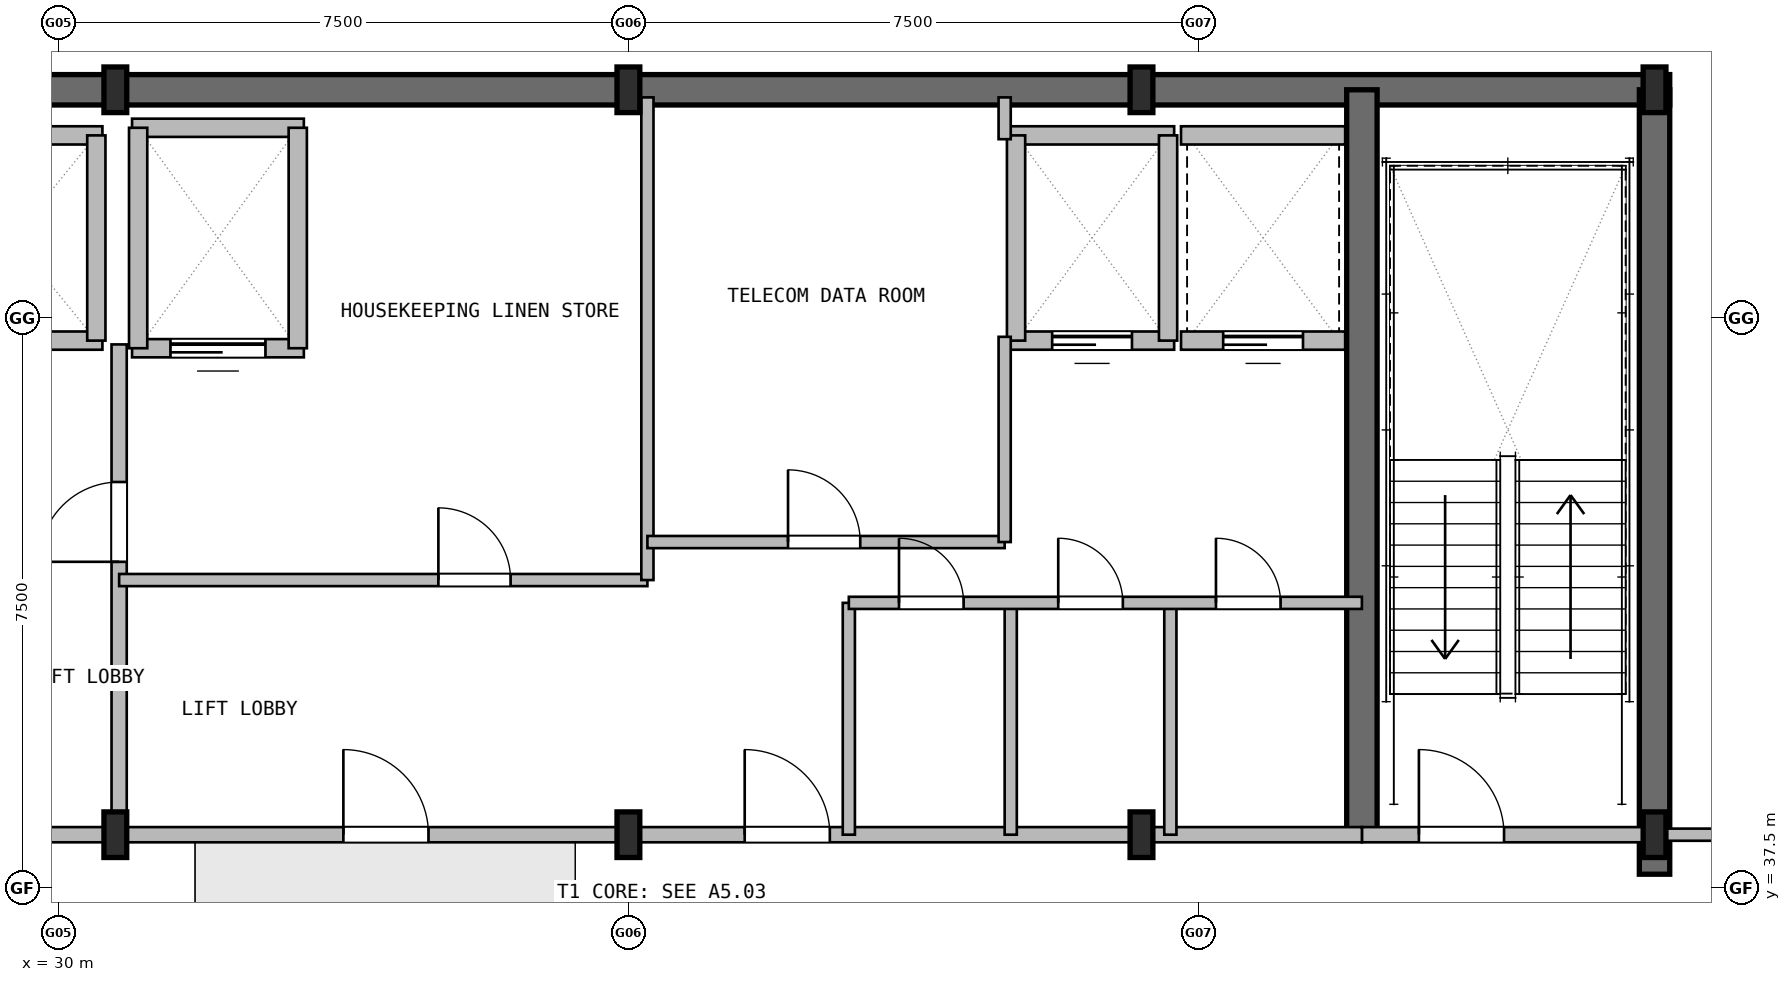
"""IFC4 building model, lengths in metres.
Left out: names, types, materials, properties, quantities, classifications, styles, units other than length and angle.
Written with IfcOpenShell. Run it as: python <this file> out.ifc"""

import sys

from ifc_helpers import new_model, si_unit, direction, frame, frame_2d, origin, origin_2d, place, context, subcontext, project, spatial, rectangle, i_section, extrude, element, fill, save


model = new_model("IFC4")
c1 = context("Model", 3, precision=1e-05, world=origin(), true_north=direction((0.0, 1.0)))
c2 = subcontext(c1, "Body", "Model", "MODEL_VIEW")
j1 = project(units=[si_unit("LENGTHUNIT", "METRE"), si_unit("PLANEANGLEUNIT", "RADIAN")], contexts=[c1])
p1 = place(None, origin())
s1 = spatial("IfcSite", under=j1, at=p1, CompositionType="ELEMENT")
p2 = place(p1, origin())
s2 = spatial("IfcBuilding", under=s1, at=p2, CompositionType="ELEMENT")
p3 = place(p2, frame((0.0, 0.0, 197.1)))
s3 = spatial("IfcBuildingStorey", under=s2, at=p3, CompositionType="ELEMENT", Elevation=197.1)
p4 = place(p3, frame((23.8, 48.0, 0.0), z_axis=(0.0, 0.0, 1.0), x_axis=(1.0, 0.0, 0.0)))
e1 = element("IfcWall", 1, at=p4, inside=s3, PredefinedType="SHEAR", context=c2, shape_type="SweptSolid", body=[
    extrude(rectangle(XDim=27.4, YDim=0.4, at=frame_2d((13.7, 0.0))), origin(), (0.0, 0.0, 1.0), 4.2),
])
p5 = place(p3, frame((51.0, 37.68, 0.0), z_axis=(0.0, 0.0, 1.0), x_axis=(0.0, 1.0, 0.0)))
e2 = element("IfcWall", 2, at=p5, inside=s3, PredefinedType="SHEAR", context=c2, shape_type="SweptSolid", body=[
    extrude(rectangle(XDim=10.32, YDim=0.4, at=frame_2d((5.16, 0.0))), origin(), (0.0, 0.0, 1.0), 4.2),
])
p6 = place(p3, frame((47.15, 38.2, 0.0), z_axis=(0.0, 0.0, 1.0), x_axis=(0.0, 1.0, 0.0)))
e3 = element("IfcWall", 3, at=p6, inside=s3, PredefinedType="SHEAR", context=c2, shape_type="SweptSolid", body=[
    extrude(rectangle(XDim=9.8, YDim=0.4, at=frame_2d((4.9, 0.0))), origin(), (0.0, 0.0, 1.0), 4.2),
])
for number, where, z_axis, x_axis in (
    (4, (30.75, 38.2, 0.0), (0.0, 0.0, 1.0), (1.0, 0.0, 0.0)),
    (5, (30.75, 48.0, 0.0), (0.0, 0.0, 1.0), (1.0, 0.0, 0.0)),
    (6, (37.5, 38.2, 0.0), (0.0, 0.0, 1.0), (1.0, 0.0, 0.0)),
    (7, (37.5, 48.0, 0.0), (0.0, 0.0, 1.0), (1.0, 0.0, 0.0)),
    (8, (44.25, 38.2, 0.0), (0.0, 0.0, 1.0), (1.0, 0.0, 0.0)),
    (9, (44.25, 48.0, 0.0), (0.0, 0.0, 1.0), (1.0, 0.0, 0.0)),
    (10, (51.0, 38.2, 0.0), (0.0, 0.0, 1.0), (1.0, 0.0, 0.0)),
    (11, (51.0, 48.0, 0.0), (0.0, 0.0, 1.0), (1.0, 0.0, 0.0)),
):
    element("IfcColumn", number, at=place(p3, frame(where, z_axis=z_axis, x_axis=x_axis)), inside=s3, PredefinedType="COLUMN", context=c2, shape_type="SweptSolid", body=[
        extrude(i_section(OverallWidth=0.3, OverallDepth=0.6, WebThickness=0.014, FlangeThickness=0.025, at=origin_2d()), origin(), (0.0, 0.0, 1.0), 4.2),
    ])
p7 = place(p3, frame((47.15, 38.2, 0.0), z_axis=(0.0, 0.0, 1.0), x_axis=(1.0, 0.0, 0.0)))
e12 = element("IfcWall", 12, at=p7, inside=s3, PredefinedType="PARTITIONING", context=c2, shape_type="SweptSolid", body=[
    extrude(rectangle(XDim=3.85, YDim=0.2, at=frame_2d((1.925, 0.0))), origin(), (0.0, 0.0, 1.0), 3.28),
])
p8 = place(p7, frame((0.75, 0.0, 0.0)))
e13 = element("IfcOpeningElement", 13, at=p8, cuts=e12, PredefinedType="OPENING", context=c2, shape_type="SweptSolid", body=[
    extrude(rectangle(XDim=1.12, YDim=2.1, at=frame_2d((0.56, 1.05))), frame((0.0, 0.11, 0.0), z_axis=(0.0, -1.0, 0.0), x_axis=(1.0, 0.0, 0.0)), (0.0, 0.0, 1.0), 0.22),
])
p9 = place(p3, frame((30.8, 38.2, 0.0), z_axis=(0.0, 0.0, 1.0), x_axis=(0.0, 1.0, 0.0)))
e14 = element("IfcWall", 14, at=p9, inside=s3, PredefinedType="PARTITIONING", context=c2, shape_type="SweptSolid", body=[
    extrude(rectangle(XDim=6.45, YDim=0.2, at=frame_2d((3.225, 0.0))), origin(), (0.0, 0.0, 1.0), 3.28),
])
p10 = place(p9, frame((3.59, 0.0, 0.0)))
e15 = element("IfcOpeningElement", 15, at=p10, cuts=e14, PredefinedType="OPENING", context=c2, shape_type="SweptSolid", body=[
    extrude(rectangle(XDim=1.05, YDim=2.1, at=frame_2d((0.525, 1.05))), frame((0.0, 0.11, 0.0), z_axis=(0.0, -1.0, 0.0), x_axis=(1.0, 0.0, 0.0)), (0.0, 0.0, 1.0), 0.22),
])
p11 = place(p3, frame((27.95, 38.2, 0.0), z_axis=(0.0, 0.0, 1.0), x_axis=(1.0, 0.0, 0.0)))
e16 = element("IfcWall", 16, at=p11, inside=s3, PredefinedType="PARTITIONING", context=c2, shape_type="SweptSolid", body=[
    extrude(rectangle(XDim=2.85, YDim=0.2, at=frame_2d((1.425, 0.0))), origin(), (0.0, 0.0, 1.0), 3.28),
])
p12 = place(p11, frame((0.75, 0.0, 0.0)))
e17 = element("IfcOpeningElement", 17, at=p12, cuts=e16, PredefinedType="OPENING", context=c2, shape_type="SweptSolid", body=[
    extrude(rectangle(XDim=1.05, YDim=2.1, at=frame_2d((0.525, 1.05))), frame((0.0, 0.11, 0.0), z_axis=(0.0, -1.0, 0.0), x_axis=(1.0, 0.0, 0.0)), (0.0, 0.0, 1.0), 0.22),
])
p13 = place(p3, frame((30.8, 38.2, 0.0), z_axis=(0.0, 0.0, 1.0), x_axis=(1.0, 0.0, 0.0)))
e18 = element("IfcWall", 18, at=p13, inside=s3, PredefinedType="PARTITIONING", context=c2, shape_type="SweptSolid", body=[
    extrude(rectangle(XDim=16.35, YDim=0.2, at=frame_2d((8.175, 0.0))), origin(), (0.0, 0.0, 1.0), 3.28),
])
p14 = place(p13, frame((2.95, 0.0, 0.0)))
e19 = element("IfcOpeningElement", 19, at=p14, cuts=e18, PredefinedType="OPENING", context=c2, shape_type="SweptSolid", body=[
    extrude(rectangle(XDim=1.12, YDim=2.1, at=frame_2d((0.56, 1.05))), frame((0.0, 0.11, 0.0), z_axis=(0.0, -1.0, 0.0), x_axis=(1.0, 0.0, 0.0)), (0.0, 0.0, 1.0), 0.22),
])
p15 = place(p13, frame((8.23, 0.0, 0.0)))
e20 = element("IfcOpeningElement", 20, at=p15, cuts=e18, PredefinedType="OPENING", context=c2, shape_type="SweptSolid", body=[
    extrude(rectangle(XDim=1.12, YDim=2.1, at=frame_2d((0.56, 1.05))), frame((0.0, 0.11, 0.0), z_axis=(0.0, -1.0, 0.0), x_axis=(1.0, 0.0, 0.0)), (0.0, 0.0, 1.0), 0.22),
])
p16 = place(p3, frame((28.22, 44.7, 0.0), z_axis=(0.0, 0.0, 1.0), x_axis=(1.0, 0.0, 0.0)))
e21 = element("IfcWall", 21, at=p16, inside=s3, PredefinedType="PARTITIONING", context=c2, shape_type="SweptSolid", body=[
    extrude(rectangle(XDim=2.36, YDim=0.24, at=frame_2d((1.18, 0.0))), origin(), (0.0, 0.0, 1.0), 3.58),
])
p17 = place(p16, frame((0.705, 0.0, 0.0)))
e22 = element("IfcOpeningElement", 22, at=p17, cuts=e21, PredefinedType="OPENING", context=c2, shape_type="SweptSolid", body=[
    extrude(rectangle(XDim=0.95, YDim=2.15, at=frame_2d((0.475, 1.075))), frame((0.0, 0.13, 0.0), z_axis=(0.0, -1.0, 0.0), x_axis=(1.0, 0.0, 0.0)), (0.0, 0.0, 1.0), 0.26),
])
p18 = place(p3, frame((28.22, 47.4, 0.0), z_axis=(0.0, 0.0, 1.0), x_axis=(1.0, 0.0, 0.0)))
e23 = element("IfcWall", 23, at=p18, inside=s3, PredefinedType="PARTITIONING", context=c2, shape_type="SweptSolid", body=[
    extrude(rectangle(XDim=2.36, YDim=0.24, at=frame_2d((1.18, 0.0))), origin(), (0.0, 0.0, 1.0), 3.88),
])
p19 = place(p3, frame((30.5, 44.7, 0.0), z_axis=(0.0, 0.0, 1.0), x_axis=(0.0, 1.0, 0.0)))
e24 = element("IfcWall", 24, at=p19, inside=s3, PredefinedType="PARTITIONING", context=c2, shape_type="SweptSolid", body=[
    extrude(rectangle(XDim=2.7, YDim=0.24, at=frame_2d((1.35, 0.0))), origin(), (0.0, 0.0, 1.0), 3.28),
])
p20 = place(p3, frame((30.97, 44.6, 0.0), z_axis=(0.0, 0.0, 1.0), x_axis=(1.0, 0.0, 0.0)))
e25 = element("IfcWall", 25, at=p20, inside=s3, PredefinedType="PARTITIONING", context=c2, shape_type="SweptSolid", body=[
    extrude(rectangle(XDim=2.26, YDim=0.24, at=frame_2d((1.13, 0.0))), origin(), (0.0, 0.0, 1.0), 3.88),
])
p21 = place(p20, frame((0.505, 0.0, 0.0)))
e26 = element("IfcOpeningElement", 26, at=p21, cuts=e25, PredefinedType="OPENING", context=c2, shape_type="SweptSolid", body=[
    extrude(rectangle(XDim=1.25, YDim=2.2, at=frame_2d((0.625, 1.1))), frame((0.0, 0.13, 0.0), z_axis=(0.0, -1.0, 0.0), x_axis=(1.0, 0.0, 0.0)), (0.0, 0.0, 1.0), 0.26),
])
p22 = place(p3, frame((30.97, 47.5, 0.0), z_axis=(0.0, 0.0, 1.0), x_axis=(1.0, 0.0, 0.0)))
e27 = element("IfcWall", 27, at=p22, inside=s3, PredefinedType="PARTITIONING", context=c2, shape_type="SweptSolid", body=[
    extrude(rectangle(XDim=2.26, YDim=0.24, at=frame_2d((1.13, 0.0))), origin(), (0.0, 0.0, 1.0), 3.88),
])
for number, where, z_axis, x_axis in (
    (28, (31.05, 44.6, 0.0), (0.0, 0.0, 1.0), (0.0, 1.0, 0.0)),
    (29, (33.15, 44.6, 0.0), (0.0, 0.0, 1.0), (0.0, 1.0, 0.0)),
):
    element("IfcWall", number, at=place(p3, frame(where, z_axis=z_axis, x_axis=x_axis)), inside=s3, PredefinedType="PARTITIONING", context=c2, shape_type="SweptSolid", body=[
        extrude(rectangle(XDim=2.9, YDim=0.24, at=frame_2d((1.45, 0.0))), origin(), (0.0, 0.0, 1.0), 3.88),
    ])
p23 = place(p3, frame((42.52, 44.7, 0.0), z_axis=(0.0, 0.0, 1.0), x_axis=(1.0, 0.0, 0.0)))
e30 = element("IfcWall", 30, at=p23, inside=s3, PredefinedType="PARTITIONING", context=c2, shape_type="SweptSolid", body=[
    extrude(rectangle(XDim=2.16, YDim=0.24, at=frame_2d((1.08, 0.0))), origin(), (0.0, 0.0, 1.0), 3.88),
])
p24 = place(p23, frame((0.555, 0.0, 0.0)))
e31 = element("IfcOpeningElement", 31, at=p24, cuts=e30, PredefinedType="OPENING", context=c2, shape_type="SweptSolid", body=[
    extrude(rectangle(XDim=1.05, YDim=2.15, at=frame_2d((0.525, 1.075))), frame((0.0, 0.13, 0.0), z_axis=(0.0, -1.0, 0.0), x_axis=(1.0, 0.0, 0.0)), (0.0, 0.0, 1.0), 0.26),
])
p25 = place(p3, frame((42.52, 47.4, 0.0), z_axis=(0.0, 0.0, 1.0), x_axis=(1.0, 0.0, 0.0)))
e32 = element("IfcWall", 32, at=p25, inside=s3, PredefinedType="PARTITIONING", context=c2, shape_type="SweptSolid", body=[
    extrude(rectangle(XDim=2.16, YDim=0.24, at=frame_2d((1.08, 0.0))), origin(), (0.0, 0.0, 1.0), 3.88),
])
for number, where, z_axis, x_axis in (
    (33, (42.6, 44.7, 0.0), (0.0, 0.0, 1.0), (0.0, 1.0, 0.0)),
    (34, (44.6, 44.7, 0.0), (0.0, 0.0, 1.0), (0.0, 1.0, 0.0)),
):
    element("IfcWall", number, at=place(p3, frame(where, z_axis=z_axis, x_axis=x_axis)), inside=s3, PredefinedType="PARTITIONING", context=c2, shape_type="SweptSolid", body=[
        extrude(rectangle(XDim=2.7, YDim=0.24, at=frame_2d((1.35, 0.0))), origin(), (0.0, 0.0, 1.0), 3.88),
    ])
p26 = place(p3, frame((44.77, 44.7, 0.0), z_axis=(0.0, 0.0, 1.0), x_axis=(1.0, 0.0, 0.0)))
e35 = element("IfcWall", 35, at=p26, inside=s3, PredefinedType="PARTITIONING", context=c2, shape_type="SweptSolid", body=[
    extrude(rectangle(XDim=2.16, YDim=0.24, at=frame_2d((1.08, 0.0))), origin(), (0.0, 0.0, 1.0), 3.88),
])
p27 = place(p26, frame((0.555, 0.0, 0.0)))
e36 = element("IfcOpeningElement", 36, at=p27, cuts=e35, PredefinedType="OPENING", context=c2, shape_type="SweptSolid", body=[
    extrude(rectangle(XDim=1.05, YDim=2.15, at=frame_2d((0.525, 1.075))), frame((0.0, 0.13, 0.0), z_axis=(0.0, -1.0, 0.0), x_axis=(1.0, 0.0, 0.0)), (0.0, 0.0, 1.0), 0.26),
])
p28 = place(p3, frame((44.77, 47.4, 0.0), z_axis=(0.0, 0.0, 1.0), x_axis=(1.0, 0.0, 0.0)))
e37 = element("IfcWall", 37, at=p28, inside=s3, PredefinedType="PARTITIONING", context=c2, shape_type="SweptSolid", body=[
    extrude(rectangle(XDim=2.16, YDim=0.24, at=frame_2d((1.08, 0.0))), origin(), (0.0, 0.0, 1.0), 3.88),
])
p29 = place(p3, frame((30.8, 41.55, 0.0), z_axis=(0.0, 0.0, 1.0), x_axis=(1.0, 0.0, 0.0)))
e38 = element("IfcWall", 38, at=p29, inside=s3, PredefinedType="PARTITIONING", context=c2, shape_type="SweptSolid", body=[
    extrude(rectangle(XDim=6.95, YDim=0.16, at=frame_2d((3.475, 0.0))), origin(), (0.0, 0.0, 1.0), 3.88),
])
p30 = place(p29, frame((4.2, 0.0, 0.0)))
e39 = element("IfcOpeningElement", 39, at=p30, cuts=e38, PredefinedType="OPENING", context=c2, shape_type="SweptSolid", body=[
    extrude(rectangle(XDim=0.95, YDim=2.1, at=frame_2d((0.475, 1.05))), frame((0.0, 0.09, 0.0), z_axis=(0.0, -1.0, 0.0), x_axis=(1.0, 0.0, 0.0)), (0.0, 0.0, 1.0), 0.18),
])
p31 = place(p3, frame((37.75, 41.55, 0.0), z_axis=(0.0, 0.0, 1.0), x_axis=(0.0, 1.0, 0.0)))
e40 = element("IfcWall", 40, at=p31, inside=s3, PredefinedType="PARTITIONING", context=c2, shape_type="SweptSolid", body=[
    extrude(rectangle(XDim=6.35, YDim=0.16, at=frame_2d((3.175, 0.0))), origin(), (0.0, 0.0, 1.0), 3.88),
])
p32 = place(p3, frame((37.75, 42.05, 0.0), z_axis=(0.0, 0.0, 1.0), x_axis=(1.0, 0.0, 0.0)))
e41 = element("IfcWall", 41, at=p32, inside=s3, PredefinedType="PARTITIONING", context=c2, shape_type="SweptSolid", body=[
    extrude(rectangle(XDim=4.7, YDim=0.16, at=frame_2d((2.35, 0.0))), origin(), (0.0, 0.0, 1.0), 3.88),
])
p33 = place(p32, frame((1.85, 0.0, 0.0)))
e42 = element("IfcOpeningElement", 42, at=p33, cuts=e41, PredefinedType="OPENING", context=c2, shape_type="SweptSolid", body=[
    extrude(rectangle(XDim=0.95, YDim=2.1, at=frame_2d((0.475, 1.05))), frame((0.0, 0.09, 0.0), z_axis=(0.0, -1.0, 0.0), x_axis=(1.0, 0.0, 0.0)), (0.0, 0.0, 1.0), 0.18),
])
p34 = place(p3, frame((42.45, 42.05, 0.0), z_axis=(0.0, 0.0, 1.0), x_axis=(0.0, 1.0, 0.0)))
e43 = element("IfcWall", 43, at=p34, inside=s3, PredefinedType="PARTITIONING", context=c2, shape_type="SweptSolid", body=[
    extrude(rectangle(XDim=2.7, YDim=0.16, at=frame_2d((1.35, 0.0))), origin(), (0.0, 0.0, 1.0), 3.88),
])
p35 = place(p3, frame((42.45, 47.35, 0.0), z_axis=(0.0, 0.0, 1.0), x_axis=(0.0, 1.0, 0.0)))
e44 = element("IfcWall", 44, at=p35, inside=s3, PredefinedType="PARTITIONING", context=c2, shape_type="SweptSolid", body=[
    extrude(rectangle(XDim=0.55, YDim=0.16, at=frame_2d((0.275, 0.0))), origin(), (0.0, 0.0, 1.0), 3.88),
])
for number, where, z_axis, x_axis in (
    (45, (40.4, 38.2, 0.0), (0.0, 0.0, 1.0), (0.0, 1.0, 0.0)),
    (46, (42.53, 38.2, 0.0), (0.0, 0.0, 1.0), (0.0, 1.0, 0.0)),
    (47, (44.63, 38.2, 0.0), (0.0, 0.0, 1.0), (0.0, 1.0, 0.0)),
):
    element("IfcWall", number, at=place(p3, frame(where, z_axis=z_axis, x_axis=x_axis)), inside=s3, PredefinedType="PARTITIONING", context=c2, shape_type="SweptSolid", body=[
        extrude(rectangle(XDim=3.05, YDim=0.16, at=frame_2d((1.525, 0.0))), origin(), (0.0, 0.0, 1.0), 3.88),
    ])
p36 = place(p3, frame((40.4, 41.25, 0.0), z_axis=(0.0, 0.0, 1.0), x_axis=(1.0, 0.0, 0.0)))
e48 = element("IfcWall", 48, at=p36, inside=s3, PredefinedType="PARTITIONING", context=c2, shape_type="SweptSolid", body=[
    extrude(rectangle(XDim=6.75, YDim=0.16, at=frame_2d((3.375, 0.0))), origin(), (0.0, 0.0, 1.0), 3.88),
])
p37 = place(p36, frame((0.66, 0.0, 0.0)))
e49 = element("IfcOpeningElement", 49, at=p37, cuts=e48, PredefinedType="OPENING", context=c2, shape_type="SweptSolid", body=[
    extrude(rectangle(XDim=0.85, YDim=2.05, at=frame_2d((0.425, 1.025))), frame((0.0, 0.09, 0.0), z_axis=(0.0, -1.0, 0.0), x_axis=(1.0, 0.0, 0.0)), (0.0, 0.0, 1.0), 0.18),
])
p38 = place(p36, frame((2.755, 0.0, 0.0)))
e50 = element("IfcOpeningElement", 50, at=p38, cuts=e48, PredefinedType="OPENING", context=c2, shape_type="SweptSolid", body=[
    extrude(rectangle(XDim=0.85, YDim=2.05, at=frame_2d((0.425, 1.025))), frame((0.0, 0.09, 0.0), z_axis=(0.0, -1.0, 0.0), x_axis=(1.0, 0.0, 0.0)), (0.0, 0.0, 1.0), 0.18),
])
p39 = place(p36, frame((4.83, 0.0, 0.0)))
e51 = element("IfcOpeningElement", 51, at=p39, cuts=e48, PredefinedType="OPENING", context=c2, shape_type="SweptSolid", body=[
    extrude(rectangle(XDim=0.85, YDim=2.05, at=frame_2d((0.425, 1.025))), frame((0.0, 0.09, 0.0), z_axis=(0.0, -1.0, 0.0), x_axis=(1.0, 0.0, 0.0)), (0.0, 0.0, 1.0), 0.18),
])
p40 = place(p3, frame((51.0, 38.2, 0.0), z_axis=(0.0, 0.0, 1.0), x_axis=(1.0, 0.0, 0.0)))
e52 = element("IfcWall", 52, at=p40, inside=s3, PredefinedType="PARTITIONING", context=c2, shape_type="SweptSolid", body=[
    extrude(rectangle(XDim=2.025, YDim=0.16, at=frame_2d((1.012, 0.0))), origin(), (0.0, 0.0, 1.0), 3.28),
])
p41 = place(p8, origin())
e53 = element("IfcDoor", 53, at=p41, inside=s3, OperationType="SINGLE_SWING_RIGHT", PredefinedType="DOOR", context=c2, shape_type="SweptSolid", body=[
    extrude(rectangle(XDim=1.12, YDim=2.1, at=frame_2d((0.56, 1.05))), frame((0.0, 0.025, 0.0), z_axis=(0.0, -1.0, 0.0), x_axis=(1.0, 0.0, 0.0)), (0.0, 0.0, 1.0), 0.05),
])
fill(e13, e53)
p42 = place(p10, origin())
e54 = element("IfcDoor", 54, at=p42, inside=s3, OperationType="SINGLE_SWING_LEFT", PredefinedType="DOOR", context=c2, shape_type="SweptSolid", body=[
    extrude(rectangle(XDim=1.05, YDim=2.1, at=frame_2d((0.525, 1.05))), frame((0.0, 0.025, 0.0), z_axis=(0.0, -1.0, 0.0), x_axis=(1.0, 0.0, 0.0)), (0.0, 0.0, 1.0), 0.05),
])
fill(e15, e54)
p43 = place(p14, origin())
e55 = element("IfcDoor", 55, at=p43, inside=s3, OperationType="SINGLE_SWING_LEFT", PredefinedType="DOOR", context=c2, shape_type="SweptSolid", body=[
    extrude(rectangle(XDim=1.12, YDim=2.1, at=frame_2d((0.56, 1.05))), frame((0.0, 0.025, 0.0), z_axis=(0.0, -1.0, 0.0), x_axis=(1.0, 0.0, 0.0)), (0.0, 0.0, 1.0), 0.05),
])
fill(e19, e55)
p44 = place(p15, origin())
e56 = element("IfcDoor", 56, at=p44, inside=s3, OperationType="SINGLE_SWING_RIGHT", PredefinedType="DOOR", context=c2, shape_type="SweptSolid", body=[
    extrude(rectangle(XDim=1.12, YDim=2.1, at=frame_2d((0.56, 1.05))), frame((0.0, 0.025, 0.0), z_axis=(0.0, -1.0, 0.0), x_axis=(1.0, 0.0, 0.0)), (0.0, 0.0, 1.0), 0.05),
])
fill(e20, e56)
p45 = place(p21, origin())
e57 = element("IfcDoor", 57, at=p45, inside=s3, OperationType="SLIDING_TO_LEFT", PredefinedType="DOOR", context=c2, shape_type="SweptSolid", body=[
    extrude(rectangle(XDim=1.25, YDim=2.2, at=frame_2d((0.625, 1.1))), frame((0.0, 0.025, 0.0), z_axis=(0.0, -1.0, 0.0), x_axis=(1.0, 0.0, 0.0)), (0.0, 0.0, 1.0), 0.05),
])
fill(e26, e57)
p46 = place(p24, origin())
e58 = element("IfcDoor", 58, at=p46, inside=s3, OperationType="SLIDING_TO_LEFT", PredefinedType="DOOR", context=c2, shape_type="SweptSolid", body=[
    extrude(rectangle(XDim=1.05, YDim=2.15, at=frame_2d((0.525, 1.075))), frame((0.0, 0.025, 0.0), z_axis=(0.0, -1.0, 0.0), x_axis=(1.0, 0.0, 0.0)), (0.0, 0.0, 1.0), 0.05),
])
fill(e31, e58)
p47 = place(p27, origin())
e59 = element("IfcDoor", 59, at=p47, inside=s3, OperationType="SLIDING_TO_LEFT", PredefinedType="DOOR", context=c2, shape_type="SweptSolid", body=[
    extrude(rectangle(XDim=1.05, YDim=2.15, at=frame_2d((0.525, 1.075))), frame((0.0, 0.025, 0.0), z_axis=(0.0, -1.0, 0.0), x_axis=(1.0, 0.0, 0.0)), (0.0, 0.0, 1.0), 0.05),
])
fill(e36, e59)
p48 = place(p30, origin())
e60 = element("IfcDoor", 60, at=p48, inside=s3, OperationType="SINGLE_SWING_RIGHT", PredefinedType="DOOR", context=c2, shape_type="SweptSolid", body=[
    extrude(rectangle(XDim=0.95, YDim=2.1, at=frame_2d((0.475, 1.05))), frame((0.0, 0.025, 0.0), z_axis=(0.0, -1.0, 0.0), x_axis=(1.0, 0.0, 0.0)), (0.0, 0.0, 1.0), 0.05),
])
fill(e39, e60)
p49 = place(p33, origin())
e61 = element("IfcDoor", 61, at=p49, inside=s3, OperationType="SINGLE_SWING_LEFT", PredefinedType="DOOR", context=c2, shape_type="SweptSolid", body=[
    extrude(rectangle(XDim=0.95, YDim=2.1, at=frame_2d((0.475, 1.05))), frame((0.0, 0.025, 0.0), z_axis=(0.0, -1.0, 0.0), x_axis=(1.0, 0.0, 0.0)), (0.0, 0.0, 1.0), 0.05),
])
fill(e42, e61)
p50 = place(p37, origin())
e62 = element("IfcDoor", 62, at=p50, inside=s3, OperationType="SINGLE_SWING_RIGHT", PredefinedType="DOOR", context=c2, shape_type="SweptSolid", body=[
    extrude(rectangle(XDim=0.85, YDim=2.05, at=frame_2d((0.425, 1.025))), frame((0.0, 0.025, 0.0), z_axis=(0.0, -1.0, 0.0), x_axis=(1.0, 0.0, 0.0)), (0.0, 0.0, 1.0), 0.05),
])
fill(e49, e62)
p51 = place(p38, origin())
e63 = element("IfcDoor", 63, at=p51, inside=s3, OperationType="SINGLE_SWING_LEFT", PredefinedType="DOOR", context=c2, shape_type="SweptSolid", body=[
    extrude(rectangle(XDim=0.85, YDim=2.05, at=frame_2d((0.425, 1.025))), frame((0.0, 0.025, 0.0), z_axis=(0.0, -1.0, 0.0), x_axis=(1.0, 0.0, 0.0)), (0.0, 0.0, 1.0), 0.05),
])
fill(e50, e63)
p52 = place(p39, origin())
e64 = element("IfcDoor", 64, at=p52, inside=s3, OperationType="SINGLE_SWING_RIGHT", PredefinedType="DOOR", context=c2, shape_type="SweptSolid", body=[
    extrude(rectangle(XDim=0.85, YDim=2.05, at=frame_2d((0.425, 1.025))), frame((0.0, 0.025, 0.0), z_axis=(0.0, -1.0, 0.0), x_axis=(1.0, 0.0, 0.0)), (0.0, 0.0, 1.0), 0.05),
])
fill(e51, e64)
save(model, sys.argv[1])
